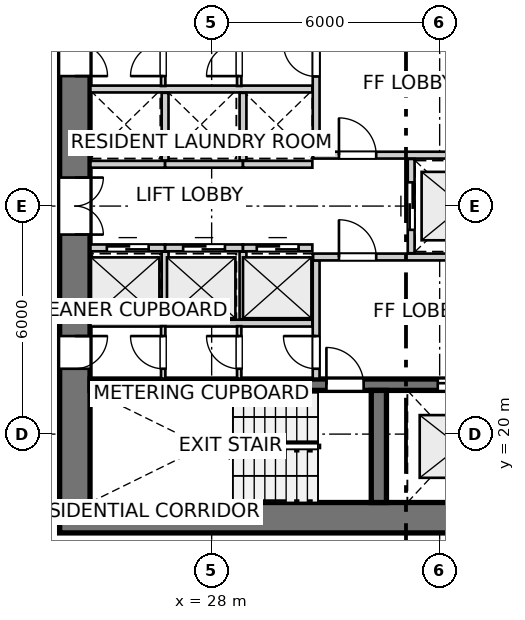
"""IFC4 building model, lengths in metres.
Left out: names, types, materials, properties, quantities, classifications, styles, units other than length and angle.
Written with IfcOpenShell. Run it as: python <this file> out.ifc"""

import sys

from ifc_helpers import new_model, si_unit, direction, frame, frame_2d, origin, place, context, subcontext, project, spatial, rectangle, extrude, source, transform, mapped, element, fill, save


model = new_model("IFC4")
c1 = context("Model", 3, precision=1e-05, world=origin(), true_north=direction((0.0, 1.0)))
c2 = subcontext(c1, "Body", "Model", "MODEL_VIEW")
j1 = project(units=[si_unit("LENGTHUNIT", "METRE"), si_unit("PLANEANGLEUNIT", "RADIAN")], contexts=[c1])
p1 = place(None, origin())
s1 = spatial("IfcSite", under=j1, at=p1, CompositionType="ELEMENT")
p2 = place(p1, origin())
s2 = spatial("IfcBuilding", under=s1, at=p2, CompositionType="ELEMENT")
p3 = place(p2, frame((0.0, 0.0, 27.0)))
s3 = spatial("IfcBuildingStorey", under=s2, at=p3, CompositionType="ELEMENT", Elevation=27.0)
p4 = place(p3, frame((24.0, 17.8, 0.0), z_axis=(0.0, 0.0, 1.0), x_axis=(1.0, 0.0, 0.0)))
e1 = element("IfcWall", 1, at=p4, inside=s3, PredefinedType="SHEAR", context=c2, shape_type="SweptSolid", body=[
    extrude(rectangle(XDim=12.7, YDim=0.8, at=frame_2d((6.35, 0.0))), origin(), (0.0, 0.0, 1.0), 2.935),
])
p5 = place(p3, frame((24.4, 33.8, 0.0), z_axis=(0.0, 0.0, 1.0), x_axis=(0.0, -1.0, 0.0)))
e2 = element("IfcWall", 2, at=p5, inside=s3, PredefinedType="SHEAR", context=c2, shape_type="SweptSolid", body=[
    extrude(rectangle(XDim=15.6, YDim=0.8, at=frame_2d((7.8, 0.0))), origin(), (0.0, 0.0, 1.0), 2.935),
])
p6 = place(p5, frame((7.05, 0.0, 0.0)))
e3 = element("IfcOpeningElement", 3, at=p6, cuts=e2, PredefinedType="OPENING", context=c2, shape_type="SweptSolid", body=[
    extrude(rectangle(XDim=1.5, YDim=2.15, at=frame_2d((0.75, 1.075))), frame((0.0, 0.41, 0.0), z_axis=(0.0, -1.0, 0.0), x_axis=(1.0, 0.0, 0.0)), (0.0, 0.0, 1.0), 0.82),
])
p7 = place(p5, frame((3.52, 0.0, 0.0)))
e4 = element("IfcOpeningElement", 4, at=p7, cuts=e2, PredefinedType="OPENING", context=c2, shape_type="SweptSolid", body=[
    extrude(rectangle(XDim=0.86, YDim=2.05, at=frame_2d((0.43, 1.025))), frame((0.0, 0.41, 0.0), z_axis=(0.0, -1.0, 0.0), x_axis=(1.0, 0.0, 0.0)), (0.0, 0.0, 1.0), 0.82),
])
p8 = place(p5, frame((11.22, 0.0, 0.0)))
e5 = element("IfcOpeningElement", 5, at=p8, cuts=e2, PredefinedType="OPENING", context=c2, shape_type="SweptSolid", body=[
    extrude(rectangle(XDim=0.86, YDim=2.05, at=frame_2d((0.43, 1.025))), frame((0.0, 0.41, 0.0), z_axis=(0.0, -1.0, 0.0), x_axis=(1.0, 0.0, 0.0)), (0.0, 0.0, 1.0), 0.82),
])
p9 = place(p3, frame((24.8, 21.3, 0.0), z_axis=(0.0, 0.0, 1.0), x_axis=(1.0, 0.0, 0.0)))
e6 = element("IfcWall", 6, at=p9, inside=s3, PredefinedType="SHEAR", context=c2, shape_type="SweptSolid", body=[
    extrude(rectangle(XDim=11.1, YDim=0.3, at=frame_2d((5.55, 0.0))), origin(), (0.0, 0.0, 1.0), 2.935),
])
p10 = place(p9, frame((6.22, 0.0, 0.0)))
e7 = element("IfcOpeningElement", 7, at=p10, cuts=e6, PredefinedType="OPENING", context=c2, shape_type="SweptSolid", body=[
    extrude(rectangle(XDim=0.98, YDim=2.15, at=frame_2d((0.49, 1.075))), frame((0.0, 0.16, 0.0), z_axis=(0.0, -1.0, 0.0), x_axis=(1.0, 0.0, 0.0)), (0.0, 0.0, 1.0), 0.32),
])
p11 = place(p9, frame((9.15, 0.0, 0.0)))
e8 = element("IfcOpeningElement", 8, at=p11, cuts=e6, PredefinedType="OPENING", context=c2, shape_type="SweptSolid", body=[
    extrude(rectangle(XDim=1.15, YDim=2.15, at=frame_2d((0.575, 1.075))), frame((0.0, 0.16, 0.0), z_axis=(0.0, -1.0, 0.0), x_axis=(1.0, 0.0, 0.0)), (0.0, 0.0, 1.0), 0.32),
])
p12 = place(p3, frame((32.4, 18.2, 0.0), z_axis=(0.0, 0.0, 1.0), x_axis=(0.0, 1.0, 0.0)))
e9 = element("IfcWall", 9, at=p12, inside=s3, PredefinedType="SHEAR", context=c2, shape_type="SweptSolid", body=[
    extrude(rectangle(XDim=2.95, YDim=0.4, at=frame_2d((1.475, 0.0))), origin(), (0.0, 0.0, 1.0), 2.935),
])
p13 = place(p3, frame((30.75, 21.46, 0.0), z_axis=(0.0, 0.0, 1.0), x_axis=(0.0, 1.0, 0.0)))
e10 = element("IfcWall", 10, at=p13, inside=s3, PredefinedType="PARTITIONING", context=c2, shape_type="SweptSolid", body=[
    extrude(rectangle(XDim=3.11, YDim=0.18, at=frame_2d((1.555, 0.0))), origin(), (0.0, 0.0, 1.0), 2.935),
])
p14 = place(p13, frame((0.26, 0.0, 0.0)))
e11 = element("IfcOpeningElement", 11, at=p14, cuts=e10, PredefinedType="OPENING", context=c2, shape_type="SweptSolid", body=[
    extrude(rectangle(XDim=0.86, YDim=2.05, at=frame_2d((0.43, 1.025))), frame((0.0, 0.1, 0.0), z_axis=(0.0, -1.0, 0.0), x_axis=(1.0, 0.0, 0.0)), (0.0, 0.0, 1.0), 0.2),
])
p15 = place(p3, frame((30.67, 24.66, 0.0), z_axis=(0.0, 0.0, 1.0), x_axis=(1.0, 0.0, 0.0)))
e12 = element("IfcWall", 12, at=p15, inside=s3, PredefinedType="PARTITIONING", context=c2, shape_type="SweptSolid", body=[
    extrude(rectangle(XDim=5.22, YDim=0.18, at=frame_2d((2.61, 0.0))), origin(), (0.0, 0.0, 1.0), 2.935),
])
p16 = place(p15, frame((0.68, 0.0, 0.0)))
e13 = element("IfcOpeningElement", 13, at=p16, cuts=e12, PredefinedType="OPENING", context=c2, shape_type="SweptSolid", body=[
    extrude(rectangle(XDim=0.98, YDim=2.15, at=frame_2d((0.49, 1.075))), frame((0.0, 0.1, 0.0), z_axis=(0.0, -1.0, 0.0), x_axis=(1.0, 0.0, 0.0)), (0.0, 0.0, 1.0), 0.2),
])
p17 = place(p3, frame((30.75, 27.43, 0.0), z_axis=(0.0, 0.0, 1.0), x_axis=(0.0, 1.0, 0.0)))
e14 = element("IfcWall", 14, at=p17, inside=s3, PredefinedType="PARTITIONING", context=c2, shape_type="SweptSolid", body=[
    extrude(rectangle(XDim=3.11, YDim=0.18, at=frame_2d((1.555, 0.0))), origin(), (0.0, 0.0, 1.0), 2.935),
])
p18 = place(p17, frame((1.98, 0.0, 0.0)))
e15 = element("IfcOpeningElement", 15, at=p18, cuts=e14, PredefinedType="OPENING", context=c2, shape_type="SweptSolid", body=[
    extrude(rectangle(XDim=0.86, YDim=2.05, at=frame_2d((0.43, 1.025))), frame((0.0, 0.1, 0.0), z_axis=(0.0, -1.0, 0.0), x_axis=(1.0, 0.0, 0.0)), (0.0, 0.0, 1.0), 0.2),
])
p19 = place(p3, frame((30.67, 27.34, 0.0), z_axis=(0.0, 0.0, 1.0), x_axis=(1.0, 0.0, 0.0)))
e16 = element("IfcWall", 16, at=p19, inside=s3, PredefinedType="PARTITIONING", context=c2, shape_type="SweptSolid", body=[
    extrude(rectangle(XDim=5.22, YDim=0.18, at=frame_2d((2.61, 0.0))), origin(), (0.0, 0.0, 1.0), 2.935),
])
p20 = place(p19, frame((0.68, 0.0, 0.0)))
e17 = element("IfcOpeningElement", 17, at=p20, cuts=e16, PredefinedType="OPENING", context=c2, shape_type="SweptSolid", body=[
    extrude(rectangle(XDim=0.98, YDim=2.15, at=frame_2d((0.49, 1.075))), frame((0.0, 0.1, 0.0), z_axis=(0.0, -1.0, 0.0), x_axis=(1.0, 0.0, 0.0)), (0.0, 0.0, 1.0), 0.2),
])
p21 = place(p3, frame((33.25, 24.76, 0.0), z_axis=(0.0, 0.0, 1.0), x_axis=(0.0, 1.0, 0.0)))
e18 = element("IfcWall", 18, at=p21, inside=s3, PredefinedType="PARTITIONING", context=c2, shape_type="SweptSolid", body=[
    extrude(rectangle(XDim=2.48, YDim=0.18, at=frame_2d((1.24, 0.0))), origin(), (0.0, 0.0, 1.0), 2.935),
])
p22 = place(p21, frame((0.615, 0.0, 0.0)))
e19 = element("IfcOpeningElement", 19, at=p22, cuts=e18, PredefinedType="OPENING", context=c2, shape_type="SweptSolid", body=[
    extrude(rectangle(XDim=1.25, YDim=2.15, at=frame_2d((0.625, 1.075))), frame((0.0, 0.1, 0.0), z_axis=(0.0, -1.0, 0.0), x_axis=(1.0, 0.0, 0.0)), (0.0, 0.0, 1.0), 0.2),
])
p23 = place(p3, frame((24.81, 22.92, 0.0), z_axis=(0.0, 0.0, 1.0), x_axis=(1.0, 0.0, 0.0)))
e20 = element("IfcWall", 20, at=p23, inside=s3, PredefinedType="PARTITIONING", context=c2, shape_type="SweptSolid", body=[
    extrude(rectangle(XDim=5.84, YDim=0.18, at=frame_2d((2.92, 0.0))), origin(), (0.0, 0.0, 1.0), 2.935),
])
p24 = place(p3, frame((24.81, 24.9, 0.0), z_axis=(0.0, 0.0, 1.0), x_axis=(1.0, 0.0, 0.0)))
e21 = element("IfcWall", 21, at=p24, inside=s3, PredefinedType="PARTITIONING", context=c2, shape_type="SweptSolid", body=[
    extrude(rectangle(XDim=1.965, YDim=0.18, at=frame_2d((0.982, 0.0))), origin(), (0.0, 0.0, 1.0), 2.935),
])
p25 = place(p24, frame((0.433, 0.0, 0.0)))
e22 = element("IfcOpeningElement", 22, at=p25, cuts=e21, PredefinedType="OPENING", context=c2, shape_type="SweptSolid", body=[
    extrude(rectangle(XDim=1.1, YDim=2.15, at=frame_2d((0.55, 1.075))), frame((0.0, 0.1, 0.0), z_axis=(0.0, -1.0, 0.0), x_axis=(1.0, 0.0, 0.0)), (0.0, 0.0, 1.0), 0.2),
])
p26 = place(p3, frame((26.775, 24.9, 0.0), z_axis=(0.0, 0.0, 1.0), x_axis=(1.0, 0.0, 0.0)))
e23 = element("IfcWall", 23, at=p26, inside=s3, PredefinedType="PARTITIONING", context=c2, shape_type="SweptSolid", body=[
    extrude(rectangle(XDim=2.05, YDim=0.18, at=frame_2d((1.025, 0.0))), origin(), (0.0, 0.0, 1.0), 2.935),
])
p27 = place(p26, frame((0.475, 0.0, 0.0)))
e24 = element("IfcOpeningElement", 24, at=p27, cuts=e23, PredefinedType="OPENING", context=c2, shape_type="SweptSolid", body=[
    extrude(rectangle(XDim=1.1, YDim=2.15, at=frame_2d((0.55, 1.075))), frame((0.0, 0.1, 0.0), z_axis=(0.0, -1.0, 0.0), x_axis=(1.0, 0.0, 0.0)), (0.0, 0.0, 1.0), 0.2),
])
p28 = place(p3, frame((26.775, 23.02, 0.0), z_axis=(0.0, 0.0, 1.0), x_axis=(0.0, 1.0, 0.0)))
e25 = element("IfcWall", 25, at=p28, inside=s3, PredefinedType="PARTITIONING", context=c2, shape_type="SweptSolid", body=[
    extrude(rectangle(XDim=1.78, YDim=0.18, at=frame_2d((0.89, 0.0))), origin(), (0.0, 0.0, 1.0), 2.935),
])
p29 = place(p3, frame((28.825, 24.9, 0.0), z_axis=(0.0, 0.0, 1.0), x_axis=(1.0, 0.0, 0.0)))
e26 = element("IfcWall", 26, at=p29, inside=s3, PredefinedType="PARTITIONING", context=c2, shape_type="SweptSolid", body=[
    extrude(rectangle(XDim=1.825, YDim=0.18, at=frame_2d((0.913, 0.0))), origin(), (0.0, 0.0, 1.0), 2.935),
])
p30 = place(p29, frame((0.363, 0.0, 0.0)))
e27 = element("IfcOpeningElement", 27, at=p30, cuts=e26, PredefinedType="OPENING", context=c2, shape_type="SweptSolid", body=[
    extrude(rectangle(XDim=1.1, YDim=2.15, at=frame_2d((0.55, 1.075))), frame((0.0, 0.1, 0.0), z_axis=(0.0, -1.0, 0.0), x_axis=(1.0, 0.0, 0.0)), (0.0, 0.0, 1.0), 0.2),
])
p31 = place(p3, frame((28.825, 23.02, 0.0), z_axis=(0.0, 0.0, 1.0), x_axis=(0.0, 1.0, 0.0)))
e28 = element("IfcWall", 28, at=p31, inside=s3, PredefinedType="PARTITIONING", context=c2, shape_type="SweptSolid", body=[
    extrude(rectangle(XDim=1.78, YDim=0.18, at=frame_2d((0.89, 0.0))), origin(), (0.0, 0.0, 1.0), 2.935),
])
p32 = place(p3, frame((24.81, 29.08, 0.0), z_axis=(0.0, 0.0, 1.0), x_axis=(1.0, 0.0, 0.0)))
e29 = element("IfcWall", 29, at=p32, inside=s3, PredefinedType="PARTITIONING", context=c2, shape_type="SweptSolid", body=[
    extrude(rectangle(XDim=5.84, YDim=0.18, at=frame_2d((2.92, 0.0))), origin(), (0.0, 0.0, 1.0), 2.935),
])
p33 = place(p3, frame((24.81, 27.1, 0.0), z_axis=(0.0, 0.0, 1.0), x_axis=(1.0, 0.0, 0.0)))
e30 = element("IfcWall", 30, at=p33, inside=s3, PredefinedType="PARTITIONING", context=c2, shape_type="SweptSolid", body=[
    extrude(rectangle(XDim=1.965, YDim=0.18, at=frame_2d((0.982, 0.0))), origin(), (0.0, 0.0, 1.0), 2.935),
])
p34 = place(p3, frame((26.775, 27.1, 0.0), z_axis=(0.0, 0.0, 1.0), x_axis=(1.0, 0.0, 0.0)))
e31 = element("IfcWall", 31, at=p34, inside=s3, PredefinedType="PARTITIONING", context=c2, shape_type="SweptSolid", body=[
    extrude(rectangle(XDim=2.05, YDim=0.18, at=frame_2d((1.025, 0.0))), origin(), (0.0, 0.0, 1.0), 2.935),
])
p35 = place(p3, frame((26.775, 27.2, 0.0), z_axis=(0.0, 0.0, 1.0), x_axis=(0.0, 1.0, 0.0)))
e32 = element("IfcWall", 32, at=p35, inside=s3, PredefinedType="PARTITIONING", context=c2, shape_type="SweptSolid", body=[
    extrude(rectangle(XDim=1.78, YDim=0.18, at=frame_2d((0.89, 0.0))), origin(), (0.0, 0.0, 1.0), 2.935),
])
p36 = place(p3, frame((28.825, 27.1, 0.0), z_axis=(0.0, 0.0, 1.0), x_axis=(1.0, 0.0, 0.0)))
e33 = element("IfcWall", 33, at=p36, inside=s3, PredefinedType="PARTITIONING", context=c2, shape_type="SweptSolid", body=[
    extrude(rectangle(XDim=1.825, YDim=0.18, at=frame_2d((0.913, 0.0))), origin(), (0.0, 0.0, 1.0), 2.935),
])
p37 = place(p3, frame((28.825, 27.2, 0.0), z_axis=(0.0, 0.0, 1.0), x_axis=(0.0, 1.0, 0.0)))
e34 = element("IfcWall", 34, at=p37, inside=s3, PredefinedType="PARTITIONING", context=c2, shape_type="SweptSolid", body=[
    extrude(rectangle(XDim=1.78, YDim=0.18, at=frame_2d((0.89, 0.0))), origin(), (0.0, 0.0, 1.0), 2.935),
])
p38 = place(p3, frame((26.725, 21.46, 0.0), z_axis=(0.0, 0.0, 1.0), x_axis=(0.0, 1.0, 0.0)))
e35 = element("IfcWall", 35, at=p38, inside=s3, PredefinedType="PARTITIONING", context=c2, shape_type="SweptSolid", body=[
    extrude(rectangle(XDim=1.38, YDim=0.115, at=frame_2d((0.69, 0.0))), origin(), (0.0, 0.0, 1.0), 2.935),
])
p39 = place(p38, frame((0.26, 0.0, 0.0)))
e36 = element("IfcOpeningElement", 36, at=p39, cuts=e35, PredefinedType="OPENING", context=c2, shape_type="SweptSolid", body=[
    extrude(rectangle(XDim=0.86, YDim=2.05, at=frame_2d((0.43, 1.025))), frame((0.0, 0.067, 0.0), z_axis=(0.0, -1.0, 0.0), x_axis=(1.0, 0.0, 0.0)), (0.0, 0.0, 1.0), 0.135),
])
p40 = place(p3, frame((26.725, 29.16, 0.0), z_axis=(0.0, 0.0, 1.0), x_axis=(0.0, 1.0, 0.0)))
e37 = element("IfcWall", 37, at=p40, inside=s3, PredefinedType="PARTITIONING", context=c2, shape_type="SweptSolid", body=[
    extrude(rectangle(XDim=1.38, YDim=0.115, at=frame_2d((0.69, 0.0))), origin(), (0.0, 0.0, 1.0), 2.935),
])
p41 = place(p40, frame((0.26, 0.0, 0.0)))
e38 = element("IfcOpeningElement", 38, at=p41, cuts=e37, PredefinedType="OPENING", context=c2, shape_type="SweptSolid", body=[
    extrude(rectangle(XDim=0.86, YDim=2.05, at=frame_2d((0.43, 1.025))), frame((0.0, 0.067, 0.0), z_axis=(0.0, -1.0, 0.0), x_axis=(1.0, 0.0, 0.0)), (0.0, 0.0, 1.0), 0.135),
])
p42 = place(p3, frame((28.725, 21.46, 0.0), z_axis=(0.0, 0.0, 1.0), x_axis=(0.0, 1.0, 0.0)))
e39 = element("IfcWall", 39, at=p42, inside=s3, PredefinedType="PARTITIONING", context=c2, shape_type="SweptSolid", body=[
    extrude(rectangle(XDim=1.38, YDim=0.115, at=frame_2d((0.69, 0.0))), origin(), (0.0, 0.0, 1.0), 2.935),
])
p43 = place(p42, frame((0.26, 0.0, 0.0)))
e40 = element("IfcOpeningElement", 40, at=p43, cuts=e39, PredefinedType="OPENING", context=c2, shape_type="SweptSolid", body=[
    extrude(rectangle(XDim=0.86, YDim=2.05, at=frame_2d((0.43, 1.025))), frame((0.0, 0.067, 0.0), z_axis=(0.0, -1.0, 0.0), x_axis=(1.0, 0.0, 0.0)), (0.0, 0.0, 1.0), 0.135),
])
p44 = place(p3, frame((28.725, 29.16, 0.0), z_axis=(0.0, 0.0, 1.0), x_axis=(0.0, 1.0, 0.0)))
e41 = element("IfcWall", 41, at=p44, inside=s3, PredefinedType="PARTITIONING", context=c2, shape_type="SweptSolid", body=[
    extrude(rectangle(XDim=1.38, YDim=0.115, at=frame_2d((0.69, 0.0))), origin(), (0.0, 0.0, 1.0), 2.935),
])
p45 = place(p44, frame((0.26, 0.0, 0.0)))
e42 = element("IfcOpeningElement", 42, at=p45, cuts=e41, PredefinedType="OPENING", context=c2, shape_type="SweptSolid", body=[
    extrude(rectangle(XDim=0.86, YDim=2.05, at=frame_2d((0.43, 1.025))), frame((0.0, 0.067, 0.0), z_axis=(0.0, -1.0, 0.0), x_axis=(1.0, 0.0, 0.0)), (0.0, 0.0, 1.0), 0.135),
])
m1 = source(origin(), c2, "Body", "SweptSolid", [
    extrude(rectangle(XDim=0.98, YDim=2.15, at=frame_2d((0.49, 1.075))), frame((0.0, 0.025, 0.0), z_axis=(0.0, -1.0, 0.0), x_axis=(1.0, 0.0, 0.0)), (0.0, 0.0, 1.0), 0.05),
])
p46 = place(p10, origin())
e43 = element("IfcDoor", 43, at=p46, inside=s3, OperationType="SINGLE_SWING_LEFT", PredefinedType="DOOR", context=c2, shape_type="MappedRepresentation", body=[
    mapped(m1, transform((0.0, 0.0, 0.0), x_axis=(1.0, 0.0, 0.0), y_axis=(0.0, 1.0, 0.0), z_axis=(0.0, 0.0, 1.0), scale=1.0)),
])
fill(e7, e43)
m2 = source(origin(), c2, "Body", "SweptSolid", [
    extrude(rectangle(XDim=1.15, YDim=2.15, at=frame_2d((0.575, 1.075))), frame((0.0, 0.025, 0.0), z_axis=(0.0, -1.0, 0.0), x_axis=(1.0, 0.0, 0.0)), (0.0, 0.0, 1.0), 0.05),
])
p47 = place(p11, origin())
e44 = element("IfcDoor", 44, at=p47, inside=s3, OperationType="DOUBLE_DOOR_SLIDING", PredefinedType="DOOR", context=c2, shape_type="MappedRepresentation", body=[
    mapped(m2, transform((0.0, 0.0, 0.0), x_axis=(1.0, 0.0, 0.0), y_axis=(0.0, 1.0, 0.0), z_axis=(0.0, 0.0, 1.0), scale=1.0)),
])
fill(e8, e44)
m3 = source(origin(), c2, "Body", "SweptSolid", [
    extrude(rectangle(XDim=1.5, YDim=2.15, at=frame_2d((0.75, 1.075))), frame((0.0, 0.025, 0.0), z_axis=(0.0, -1.0, 0.0), x_axis=(1.0, 0.0, 0.0)), (0.0, 0.0, 1.0), 0.05),
])
p48 = place(p6, origin())
e45 = element("IfcDoor", 45, at=p48, inside=s3, OperationType="DOUBLE_DOOR_SINGLE_SWING", PredefinedType="DOOR", context=c2, shape_type="MappedRepresentation", body=[
    mapped(m3, transform((0.0, 0.0, 0.0), x_axis=(1.0, 0.0, 0.0), y_axis=(0.0, 1.0, 0.0), z_axis=(0.0, 0.0, 1.0), scale=1.0)),
])
fill(e3, e45)
m4 = source(origin(), c2, "Body", "SweptSolid", [
    extrude(rectangle(XDim=0.86, YDim=2.05, at=frame_2d((0.43, 1.025))), frame((0.0, 0.025, 0.0), z_axis=(0.0, -1.0, 0.0), x_axis=(1.0, 0.0, 0.0)), (0.0, 0.0, 1.0), 0.05),
])
p49 = place(p7, origin())
e46 = element("IfcDoor", 46, at=p49, inside=s3, OperationType="SINGLE_SWING_RIGHT", PredefinedType="DOOR", context=c2, shape_type="MappedRepresentation", body=[
    mapped(m4, transform((0.0, 0.0, 0.0), x_axis=(1.0, 0.0, 0.0), y_axis=(0.0, 1.0, 0.0), z_axis=(0.0, 0.0, 1.0), scale=1.0)),
])
fill(e4, e46)
p50 = place(p8, origin())
e47 = element("IfcDoor", 47, at=p50, inside=s3, OperationType="SINGLE_SWING_LEFT", PredefinedType="DOOR", context=c2, shape_type="MappedRepresentation", body=[
    mapped(m4, transform((0.0, 0.0, 0.0), x_axis=(1.0, 0.0, 0.0), y_axis=(0.0, 1.0, 0.0), z_axis=(0.0, 0.0, 1.0), scale=1.0)),
])
fill(e5, e47)
p51 = place(p14, origin())
e48 = element("IfcDoor", 48, at=p51, inside=s3, OperationType="SINGLE_SWING_RIGHT", PredefinedType="DOOR", context=c2, shape_type="MappedRepresentation", body=[
    mapped(m4, transform((0.0, 0.0, 0.0), x_axis=(1.0, 0.0, 0.0), y_axis=(0.0, 1.0, 0.0), z_axis=(0.0, 0.0, 1.0), scale=1.0)),
])
fill(e11, e48)
p52 = place(p16, origin())
e49 = element("IfcDoor", 49, at=p52, inside=s3, OperationType="SINGLE_SWING_LEFT", PredefinedType="DOOR", context=c2, shape_type="MappedRepresentation", body=[
    mapped(m1, transform((0.0, 0.0, 0.0), x_axis=(1.0, 0.0, 0.0), y_axis=(0.0, 1.0, 0.0), z_axis=(0.0, 0.0, 1.0), scale=1.0)),
])
fill(e13, e49)
p53 = place(p18, origin())
e50 = element("IfcDoor", 50, at=p53, inside=s3, OperationType="SINGLE_SWING_RIGHT", PredefinedType="DOOR", context=c2, shape_type="MappedRepresentation", body=[
    mapped(m4, transform((0.0, 0.0, 0.0), x_axis=(1.0, 0.0, 0.0), y_axis=(0.0, 1.0, 0.0), z_axis=(0.0, 0.0, 1.0), scale=1.0)),
])
fill(e15, e50)
p54 = place(p20, origin())
e51 = element("IfcDoor", 51, at=p54, inside=s3, OperationType="SINGLE_SWING_LEFT", PredefinedType="DOOR", context=c2, shape_type="MappedRepresentation", body=[
    mapped(m1, transform((0.0, 0.0, 0.0), x_axis=(1.0, 0.0, 0.0), y_axis=(0.0, 1.0, 0.0), z_axis=(0.0, 0.0, 1.0), scale=1.0)),
])
fill(e17, e51)
m5 = source(origin(), c2, "Body", "SweptSolid", [
    extrude(rectangle(XDim=1.25, YDim=2.15, at=frame_2d((0.625, 1.075))), frame((0.0, 0.025, 0.0), z_axis=(0.0, -1.0, 0.0), x_axis=(1.0, 0.0, 0.0)), (0.0, 0.0, 1.0), 0.05),
])
p55 = place(p22, origin())
e52 = element("IfcDoor", 52, at=p55, inside=s3, OperationType="DOUBLE_DOOR_SLIDING", PredefinedType="DOOR", context=c2, shape_type="MappedRepresentation", body=[
    mapped(m5, transform((0.0, 0.0, 0.0), x_axis=(1.0, 0.0, 0.0), y_axis=(0.0, 1.0, 0.0), z_axis=(0.0, 0.0, 1.0), scale=1.0)),
])
fill(e19, e52)
m6 = source(origin(), c2, "Body", "SweptSolid", [
    extrude(rectangle(XDim=1.1, YDim=2.15, at=frame_2d((0.55, 1.075))), frame((0.0, 0.025, 0.0), z_axis=(0.0, -1.0, 0.0), x_axis=(1.0, 0.0, 0.0)), (0.0, 0.0, 1.0), 0.05),
])
p56 = place(p25, origin())
e53 = element("IfcDoor", 53, at=p56, inside=s3, OperationType="DOUBLE_DOOR_SLIDING", PredefinedType="DOOR", context=c2, shape_type="MappedRepresentation", body=[
    mapped(m6, transform((0.0, 0.0, 0.0), x_axis=(1.0, 0.0, 0.0), y_axis=(0.0, 1.0, 0.0), z_axis=(0.0, 0.0, 1.0), scale=1.0)),
])
fill(e22, e53)
p57 = place(p27, origin())
e54 = element("IfcDoor", 54, at=p57, inside=s3, OperationType="DOUBLE_DOOR_SLIDING", PredefinedType="DOOR", context=c2, shape_type="MappedRepresentation", body=[
    mapped(m6, transform((0.0, 0.0, 0.0), x_axis=(1.0, 0.0, 0.0), y_axis=(0.0, 1.0, 0.0), z_axis=(0.0, 0.0, 1.0), scale=1.0)),
])
fill(e24, e54)
p58 = place(p30, origin())
e55 = element("IfcDoor", 55, at=p58, inside=s3, OperationType="DOUBLE_DOOR_SLIDING", PredefinedType="DOOR", context=c2, shape_type="MappedRepresentation", body=[
    mapped(m6, transform((0.0, 0.0, 0.0), x_axis=(1.0, 0.0, 0.0), y_axis=(0.0, 1.0, 0.0), z_axis=(0.0, 0.0, 1.0), scale=1.0)),
])
fill(e27, e55)
p59 = place(p39, origin())
e56 = element("IfcDoor", 56, at=p59, inside=s3, OperationType="SINGLE_SWING_RIGHT", PredefinedType="DOOR", context=c2, shape_type="MappedRepresentation", body=[
    mapped(m4, transform((0.0, 0.0, 0.0), x_axis=(1.0, 0.0, 0.0), y_axis=(0.0, 1.0, 0.0), z_axis=(0.0, 0.0, 1.0), scale=1.0)),
])
fill(e36, e56)
p60 = place(p41, origin())
e57 = element("IfcDoor", 57, at=p60, inside=s3, OperationType="SINGLE_SWING_LEFT", PredefinedType="DOOR", context=c2, shape_type="MappedRepresentation", body=[
    mapped(m4, transform((0.0, 0.0, 0.0), x_axis=(1.0, 0.0, 0.0), y_axis=(0.0, 1.0, 0.0), z_axis=(0.0, 0.0, 1.0), scale=1.0)),
])
fill(e38, e57)
p61 = place(p43, origin())
e58 = element("IfcDoor", 58, at=p61, inside=s3, OperationType="SINGLE_SWING_RIGHT", PredefinedType="DOOR", context=c2, shape_type="MappedRepresentation", body=[
    mapped(m4, transform((0.0, 0.0, 0.0), x_axis=(1.0, 0.0, 0.0), y_axis=(0.0, 1.0, 0.0), z_axis=(0.0, 0.0, 1.0), scale=1.0)),
])
fill(e40, e58)
p62 = place(p45, origin())
e59 = element("IfcDoor", 59, at=p62, inside=s3, OperationType="SINGLE_SWING_LEFT", PredefinedType="DOOR", context=c2, shape_type="MappedRepresentation", body=[
    mapped(m4, transform((0.0, 0.0, 0.0), x_axis=(1.0, 0.0, 0.0), y_axis=(0.0, 1.0, 0.0), z_axis=(0.0, 0.0, 1.0), scale=1.0)),
])
fill(e42, e59)
save(model, sys.argv[1])
